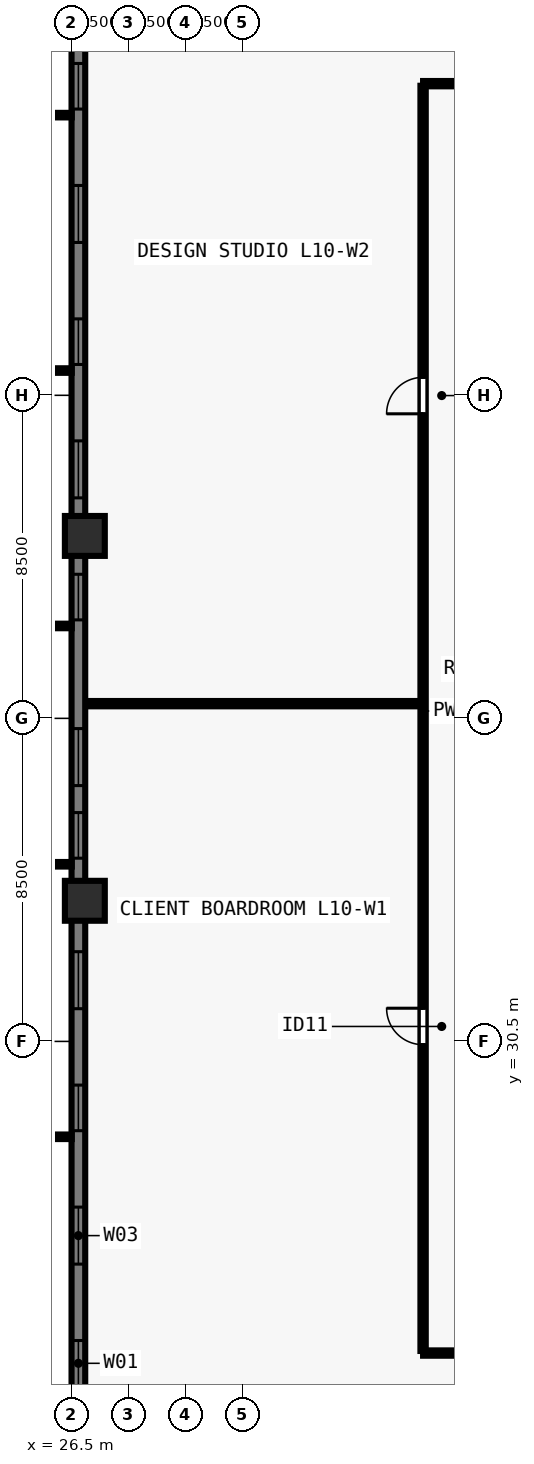
"""IFC4 building model, lengths in metres.
Left out: names, types, materials, properties, quantities, classifications, styles, units other than length and angle.
Written with IfcOpenShell. Run it as: python <this file> out.ifc"""

import sys

from ifc_helpers import new_model, si_unit, direction, frame, frame_2d, origin, origin_2d, place, context, subcontext, project, spatial, rectangle, extrude, element, fill, save


model = new_model("IFC4")
c1 = context("Model", 3, precision=1e-05, world=origin(), true_north=direction((0.0, 1.0)))
c2 = subcontext(c1, "Body", "Model", "MODEL_VIEW")
j1 = project(units=[si_unit("LENGTHUNIT", "METRE"), si_unit("PLANEANGLEUNIT", "RADIAN")], contexts=[c1])
p1 = place(None, origin())
s1 = spatial("IfcSite", under=j1, at=p1, CompositionType="ELEMENT")
p2 = place(p1, origin())
s2 = spatial("IfcBuilding", under=s1, at=p2, CompositionType="ELEMENT")
p3 = place(p2, frame((0.0, 0.0, 41.0)))
s3 = spatial("IfcBuildingStorey", under=s2, at=p3, CompositionType="ELEMENT", Elevation=41.0)
for number, where, z_axis, x_axis in (
    (1, (26.85, 43.8, 0.0), (0.0, 0.0, 1.0), (0.0, 1.0, 0.0)),
    (2, (26.85, 34.2, 0.0), (0.0, 0.0, 1.0), (0.0, 1.0, 0.0)),
):
    element("IfcColumn", number, at=place(p3, frame(where, z_axis=z_axis, x_axis=x_axis)), inside=s3, PredefinedType="COLUMN", context=c2, shape_type="SweptSolid", body=[
        extrude(rectangle(XDim=1.05, YDim=1.05, at=origin_2d()), origin(), (0.0, 0.0, 1.0), 3.5),
    ])
p4 = place(p3, frame((26.68, 16.5, 0.0), z_axis=(0.0, 0.0, 1.0), x_axis=(0.0, 1.0, 0.0)))
e3 = element("IfcWall", 3, at=p4, inside=s3, PredefinedType="SOLIDWALL", context=c2, shape_type="SweptSolid", body=[
    extrude(rectangle(XDim=44.662, YDim=0.36, at=frame_2d((22.331, 0.0))), origin(), (0.0, 0.0, 1.0), 3.28),
])
p5 = place(p4, frame((4.93, 0.0, 0.8)))
e4 = element("IfcOpeningElement", 4, at=p5, cuts=e3, PredefinedType="OPENING", context=c2, shape_type="SweptSolid", body=[
    extrude(rectangle(XDim=1.2, YDim=1.544, at=frame_2d((0.6, 0.772))), frame((0.0, 0.19, 0.0), z_axis=(0.0, -1.0, 0.0), x_axis=(1.0, 0.0, 0.0)), (0.0, 0.0, 1.0), 0.38),
])
p6 = place(p4, frame((8.14, 0.0, 0.8)))
e5 = element("IfcOpeningElement", 5, at=p6, cuts=e3, PredefinedType="OPENING", context=c2, shape_type="SweptSolid", body=[
    extrude(rectangle(XDim=1.5, YDim=1.544, at=frame_2d((0.75, 0.772))), frame((0.0, 0.19, 0.0), z_axis=(0.0, -1.0, 0.0), x_axis=(1.0, 0.0, 0.0)), (0.0, 0.0, 1.0), 0.38),
])
p7 = place(p4, frame((11.65, 0.0, 0.8)))
e6 = element("IfcOpeningElement", 6, at=p7, cuts=e3, PredefinedType="OPENING", context=c2, shape_type="SweptSolid", body=[
    extrude(rectangle(XDim=1.2, YDim=1.544, at=frame_2d((0.6, 0.772))), frame((0.0, 0.19, 0.0), z_axis=(0.0, -1.0, 0.0), x_axis=(1.0, 0.0, 0.0)), (0.0, 0.0, 1.0), 0.38),
])
p8 = place(p4, frame((14.861, 0.0, 0.8)))
e7 = element("IfcOpeningElement", 7, at=p8, cuts=e3, PredefinedType="OPENING", context=c2, shape_type="SweptSolid", body=[
    extrude(rectangle(XDim=1.5, YDim=1.544, at=frame_2d((0.75, 0.772))), frame((0.0, 0.19, 0.0), z_axis=(0.0, -1.0, 0.0), x_axis=(1.0, 0.0, 0.0)), (0.0, 0.0, 1.0), 0.38),
])
p9 = place(p4, frame((18.821, 0.0, 0.8)))
e8 = element("IfcOpeningElement", 8, at=p9, cuts=e3, PredefinedType="OPENING", context=c2, shape_type="SweptSolid", body=[
    extrude(rectangle(XDim=1.2, YDim=1.544, at=frame_2d((0.6, 0.772))), frame((0.0, 0.19, 0.0), z_axis=(0.0, -1.0, 0.0), x_axis=(1.0, 0.0, 0.0)), (0.0, 0.0, 1.0), 0.38),
])
p10 = place(p4, frame((20.731, 0.0, 0.8)))
e9 = element("IfcOpeningElement", 9, at=p10, cuts=e3, PredefinedType="OPENING", context=c2, shape_type="SweptSolid", body=[
    extrude(rectangle(XDim=1.5, YDim=1.544, at=frame_2d((0.75, 0.772))), frame((0.0, 0.19, 0.0), z_axis=(0.0, -1.0, 0.0), x_axis=(1.0, 0.0, 0.0)), (0.0, 0.0, 1.0), 0.38),
])
p11 = place(p4, frame((25.091, 0.0, 0.8)))
e10 = element("IfcOpeningElement", 10, at=p11, cuts=e3, PredefinedType="OPENING", context=c2, shape_type="SweptSolid", body=[
    extrude(rectangle(XDim=1.2, YDim=1.544, at=frame_2d((0.6, 0.772))), frame((0.0, 0.19, 0.0), z_axis=(0.0, -1.0, 0.0), x_axis=(1.0, 0.0, 0.0)), (0.0, 0.0, 1.0), 0.38),
])
p12 = place(p4, frame((28.302, 0.0, 0.8)))
e11 = element("IfcOpeningElement", 11, at=p12, cuts=e3, PredefinedType="OPENING", context=c2, shape_type="SweptSolid", body=[
    extrude(rectangle(XDim=1.5, YDim=1.544, at=frame_2d((0.75, 0.772))), frame((0.0, 0.19, 0.0), z_axis=(0.0, -1.0, 0.0), x_axis=(1.0, 0.0, 0.0)), (0.0, 0.0, 1.0), 0.38),
])
p13 = place(p4, frame((31.812, 0.0, 0.8)))
e12 = element("IfcOpeningElement", 12, at=p13, cuts=e3, PredefinedType="OPENING", context=c2, shape_type="SweptSolid", body=[
    extrude(rectangle(XDim=1.2, YDim=1.544, at=frame_2d((0.6, 0.772))), frame((0.0, 0.19, 0.0), z_axis=(0.0, -1.0, 0.0), x_axis=(1.0, 0.0, 0.0)), (0.0, 0.0, 1.0), 0.38),
])
p14 = place(p4, frame((35.022, 0.0, 0.8)))
e13 = element("IfcOpeningElement", 13, at=p14, cuts=e3, PredefinedType="OPENING", context=c2, shape_type="SweptSolid", body=[
    extrude(rectangle(XDim=1.5, YDim=1.544, at=frame_2d((0.75, 0.772))), frame((0.0, 0.19, 0.0), z_axis=(0.0, -1.0, 0.0), x_axis=(1.0, 0.0, 0.0)), (0.0, 0.0, 1.0), 0.38),
])
p15 = place(p4, frame((38.532, 0.0, 0.8)))
e14 = element("IfcOpeningElement", 14, at=p15, cuts=e3, PredefinedType="OPENING", context=c2, shape_type="SweptSolid", body=[
    extrude(rectangle(XDim=1.2, YDim=1.544, at=frame_2d((0.6, 0.772))), frame((0.0, 0.19, 0.0), z_axis=(0.0, -1.0, 0.0), x_axis=(1.0, 0.0, 0.0)), (0.0, 0.0, 1.0), 0.38),
])
p16 = place(p3, frame((35.75, 22.3, 0.0), z_axis=(0.0, 0.0, 1.0), x_axis=(1.0, 0.0, 0.0)))
e15 = element("IfcWall", 15, at=p16, inside=s3, PredefinedType="PARTITIONING", context=c2, shape_type="SweptSolid", body=[
    extrude(rectangle(XDim=32.5, YDim=0.14, at=frame_2d((16.25, 0.0))), origin(), (0.0, 0.0, 1.0), 3.28),
])
p17 = place(p16, frame((1.604, 0.0, 0.0)))
e16 = element("IfcOpeningElement", 16, at=p17, cuts=e15, PredefinedType="OPENING", context=c2, shape_type="SweptSolid", body=[
    extrude(rectangle(XDim=0.96, YDim=2.12, at=frame_2d((0.48, 1.06))), frame((0.0, 0.08, 0.0), z_axis=(0.0, -1.0, 0.0), x_axis=(1.0, 0.0, 0.0)), (0.0, 0.0, 1.0), 0.16),
])
p18 = place(p16, frame((9.585, 0.0, 0.0)))
e17 = element("IfcOpeningElement", 17, at=p18, cuts=e15, PredefinedType="OPENING", context=c2, shape_type="SweptSolid", body=[
    extrude(rectangle(XDim=0.96, YDim=2.12, at=frame_2d((0.48, 1.06))), frame((0.0, 0.08, 0.0), z_axis=(0.0, -1.0, 0.0), x_axis=(1.0, 0.0, 0.0)), (0.0, 0.0, 1.0), 0.16),
])
p19 = place(p16, frame((22.125, 0.0, 0.0)))
e18 = element("IfcOpeningElement", 18, at=p19, cuts=e15, PredefinedType="OPENING", context=c2, shape_type="SweptSolid", body=[
    extrude(rectangle(XDim=0.96, YDim=2.12, at=frame_2d((0.48, 1.06))), frame((0.0, 0.08, 0.0), z_axis=(0.0, -1.0, 0.0), x_axis=(1.0, 0.0, 0.0)), (0.0, 0.0, 1.0), 0.16),
])
p20 = place(p16, frame((31.18, 0.0, 0.0)))
e19 = element("IfcOpeningElement", 19, at=p20, cuts=e15, PredefinedType="OPENING", context=c2, shape_type="SweptSolid", body=[
    extrude(rectangle(XDim=0.96, YDim=2.12, at=frame_2d((0.48, 1.06))), frame((0.0, 0.08, 0.0), z_axis=(0.0, -1.0, 0.0), x_axis=(1.0, 0.0, 0.0)), (0.0, 0.0, 1.0), 0.16),
])
p21 = place(p3, frame((35.75, 55.7, 0.0), z_axis=(0.0, 0.0, 1.0), x_axis=(1.0, 0.0, 0.0)))
e20 = element("IfcWall", 20, at=p21, inside=s3, PredefinedType="PARTITIONING", context=c2, shape_type="SweptSolid", body=[
    extrude(rectangle(XDim=32.5, YDim=0.14, at=frame_2d((16.25, 0.0))), origin(), (0.0, 0.0, 1.0), 3.28),
])
p22 = place(p21, frame((3.154, 0.0, 0.0)))
e21 = element("IfcOpeningElement", 21, at=p22, cuts=e20, PredefinedType="OPENING", context=c2, shape_type="SweptSolid", body=[
    extrude(rectangle(XDim=0.96, YDim=2.12, at=frame_2d((0.48, 1.06))), frame((0.0, 0.08, 0.0), z_axis=(0.0, -1.0, 0.0), x_axis=(1.0, 0.0, 0.0)), (0.0, 0.0, 1.0), 0.16),
])
p23 = place(p21, frame((27.834, 0.0, 0.0)))
e22 = element("IfcOpeningElement", 22, at=p23, cuts=e20, PredefinedType="OPENING", context=c2, shape_type="SweptSolid", body=[
    extrude(rectangle(XDim=0.96, YDim=2.12, at=frame_2d((0.48, 1.06))), frame((0.0, 0.08, 0.0), z_axis=(0.0, -1.0, 0.0), x_axis=(1.0, 0.0, 0.0)), (0.0, 0.0, 1.0), 0.16),
])
p24 = place(p3, frame((35.75, 22.355, 0.0), z_axis=(0.0, 0.0, 1.0), x_axis=(0.0, 1.0, 0.0)))
e23 = element("IfcWall", 23, at=p24, inside=s3, PredefinedType="PARTITIONING", context=c2, shape_type="SweptSolid", body=[
    extrude(rectangle(XDim=33.29, YDim=0.14, at=frame_2d((16.645, 0.0))), origin(), (0.0, 0.0, 1.0), 3.28),
])
p25 = place(p24, frame((8.058, 0.0, 0.0)))
e24 = element("IfcOpeningElement", 24, at=p25, cuts=e23, PredefinedType="OPENING", context=c2, shape_type="SweptSolid", body=[
    extrude(rectangle(XDim=0.96, YDim=2.12, at=frame_2d((0.48, 1.06))), frame((0.0, 0.08, 0.0), z_axis=(0.0, -1.0, 0.0), x_axis=(1.0, 0.0, 0.0)), (0.0, 0.0, 1.0), 0.16),
])
p26 = place(p24, frame((24.658, 0.0, 0.0)))
e25 = element("IfcOpeningElement", 25, at=p26, cuts=e23, PredefinedType="OPENING", context=c2, shape_type="SweptSolid", body=[
    extrude(rectangle(XDim=0.96, YDim=2.12, at=frame_2d((0.48, 1.06))), frame((0.0, 0.08, 0.0), z_axis=(0.0, -1.0, 0.0), x_axis=(1.0, 0.0, 0.0)), (0.0, 0.0, 1.0), 0.16),
])
p27 = place(p3, frame((26.92, 39.387, 0.0), z_axis=(0.0, 0.0, 1.0), x_axis=(1.0, 0.0, 0.0)))
e26 = element("IfcWall", 26, at=p27, inside=s3, PredefinedType="PARTITIONING", context=c2, shape_type="SweptSolid", body=[
    extrude(rectangle(XDim=8.73, YDim=0.14, at=frame_2d((4.365, 0.0))), origin(), (0.0, 0.0, 1.0), 2.849),
])
p28 = place(p5, origin())
e27 = element("IfcWindow", 27, at=p28, inside=s3, PartitioningType="SINGLE_PANEL", PredefinedType="WINDOW", context=c2, shape_type="SweptSolid", body=[
    extrude(rectangle(XDim=1.2, YDim=1.544, at=frame_2d((0.6, 0.772))), frame((0.0, -0.05, 0.0), z_axis=(0.0, -1.0, 0.0), x_axis=(1.0, 0.0, 0.0)), (0.0, 0.0, 1.0), 0.06),
])
fill(e4, e27)
p29 = place(p6, origin())
e28 = element("IfcWindow", 28, at=p29, inside=s3, PartitioningType="SINGLE_PANEL", PredefinedType="WINDOW", context=c2, shape_type="SweptSolid", body=[
    extrude(rectangle(XDim=1.5, YDim=1.544, at=frame_2d((0.75, 0.772))), frame((0.0, -0.05, 0.0), z_axis=(0.0, -1.0, 0.0), x_axis=(1.0, 0.0, 0.0)), (0.0, 0.0, 1.0), 0.06),
])
fill(e5, e28)
p30 = place(p7, origin())
e29 = element("IfcWindow", 29, at=p30, inside=s3, PartitioningType="SINGLE_PANEL", PredefinedType="WINDOW", context=c2, shape_type="SweptSolid", body=[
    extrude(rectangle(XDim=1.2, YDim=1.544, at=frame_2d((0.6, 0.772))), frame((0.0, -0.05, 0.0), z_axis=(0.0, -1.0, 0.0), x_axis=(1.0, 0.0, 0.0)), (0.0, 0.0, 1.0), 0.06),
])
fill(e6, e29)
p31 = place(p8, origin())
e30 = element("IfcWindow", 30, at=p31, inside=s3, PartitioningType="SINGLE_PANEL", PredefinedType="WINDOW", context=c2, shape_type="SweptSolid", body=[
    extrude(rectangle(XDim=1.5, YDim=1.544, at=frame_2d((0.75, 0.772))), frame((0.0, -0.05, 0.0), z_axis=(0.0, -1.0, 0.0), x_axis=(1.0, 0.0, 0.0)), (0.0, 0.0, 1.0), 0.06),
])
fill(e7, e30)
p32 = place(p9, origin())
e31 = element("IfcWindow", 31, at=p32, inside=s3, PartitioningType="SINGLE_PANEL", PredefinedType="WINDOW", context=c2, shape_type="SweptSolid", body=[
    extrude(rectangle(XDim=1.2, YDim=1.544, at=frame_2d((0.6, 0.772))), frame((0.0, -0.05, 0.0), z_axis=(0.0, -1.0, 0.0), x_axis=(1.0, 0.0, 0.0)), (0.0, 0.0, 1.0), 0.06),
])
fill(e8, e31)
p33 = place(p10, origin())
e32 = element("IfcWindow", 32, at=p33, inside=s3, PartitioningType="SINGLE_PANEL", PredefinedType="WINDOW", context=c2, shape_type="SweptSolid", body=[
    extrude(rectangle(XDim=1.5, YDim=1.544, at=frame_2d((0.75, 0.772))), frame((0.0, -0.05, 0.0), z_axis=(0.0, -1.0, 0.0), x_axis=(1.0, 0.0, 0.0)), (0.0, 0.0, 1.0), 0.06),
])
fill(e9, e32)
p34 = place(p11, origin())
e33 = element("IfcWindow", 33, at=p34, inside=s3, PartitioningType="SINGLE_PANEL", PredefinedType="WINDOW", context=c2, shape_type="SweptSolid", body=[
    extrude(rectangle(XDim=1.2, YDim=1.544, at=frame_2d((0.6, 0.772))), frame((0.0, -0.05, 0.0), z_axis=(0.0, -1.0, 0.0), x_axis=(1.0, 0.0, 0.0)), (0.0, 0.0, 1.0), 0.06),
])
fill(e10, e33)
p35 = place(p12, origin())
e34 = element("IfcWindow", 34, at=p35, inside=s3, PartitioningType="SINGLE_PANEL", PredefinedType="WINDOW", context=c2, shape_type="SweptSolid", body=[
    extrude(rectangle(XDim=1.5, YDim=1.544, at=frame_2d((0.75, 0.772))), frame((0.0, -0.05, 0.0), z_axis=(0.0, -1.0, 0.0), x_axis=(1.0, 0.0, 0.0)), (0.0, 0.0, 1.0), 0.06),
])
fill(e11, e34)
p36 = place(p13, origin())
e35 = element("IfcWindow", 35, at=p36, inside=s3, PartitioningType="SINGLE_PANEL", PredefinedType="WINDOW", context=c2, shape_type="SweptSolid", body=[
    extrude(rectangle(XDim=1.2, YDim=1.544, at=frame_2d((0.6, 0.772))), frame((0.0, -0.05, 0.0), z_axis=(0.0, -1.0, 0.0), x_axis=(1.0, 0.0, 0.0)), (0.0, 0.0, 1.0), 0.06),
])
fill(e12, e35)
p37 = place(p14, origin())
e36 = element("IfcWindow", 36, at=p37, inside=s3, PartitioningType="SINGLE_PANEL", PredefinedType="WINDOW", context=c2, shape_type="SweptSolid", body=[
    extrude(rectangle(XDim=1.5, YDim=1.544, at=frame_2d((0.75, 0.772))), frame((0.0, -0.05, 0.0), z_axis=(0.0, -1.0, 0.0), x_axis=(1.0, 0.0, 0.0)), (0.0, 0.0, 1.0), 0.06),
])
fill(e13, e36)
p38 = place(p15, origin())
e37 = element("IfcWindow", 37, at=p38, inside=s3, PartitioningType="SINGLE_PANEL", PredefinedType="WINDOW", context=c2, shape_type="SweptSolid", body=[
    extrude(rectangle(XDim=1.2, YDim=1.544, at=frame_2d((0.6, 0.772))), frame((0.0, -0.05, 0.0), z_axis=(0.0, -1.0, 0.0), x_axis=(1.0, 0.0, 0.0)), (0.0, 0.0, 1.0), 0.06),
])
fill(e14, e37)
p39 = place(p25, origin())
e38 = element("IfcDoor", 38, at=p39, inside=s3, OperationType="SINGLE_SWING_RIGHT", PredefinedType="DOOR", context=c2, shape_type="SweptSolid", body=[
    extrude(rectangle(XDim=0.96, YDim=2.12, at=frame_2d((0.48, 1.06))), frame((0.0, 0.025, 0.0), z_axis=(0.0, -1.0, 0.0), x_axis=(1.0, 0.0, 0.0)), (0.0, 0.0, 1.0), 0.05),
])
fill(e24, e38)
p40 = place(p26, origin())
e39 = element("IfcDoor", 39, at=p40, inside=s3, OperationType="SINGLE_SWING_LEFT", PredefinedType="DOOR", context=c2, shape_type="SweptSolid", body=[
    extrude(rectangle(XDim=0.96, YDim=2.12, at=frame_2d((0.48, 1.06))), frame((0.0, 0.025, 0.0), z_axis=(0.0, -1.0, 0.0), x_axis=(1.0, 0.0, 0.0)), (0.0, 0.0, 1.0), 0.05),
])
fill(e25, e39)
save(model, sys.argv[1])
